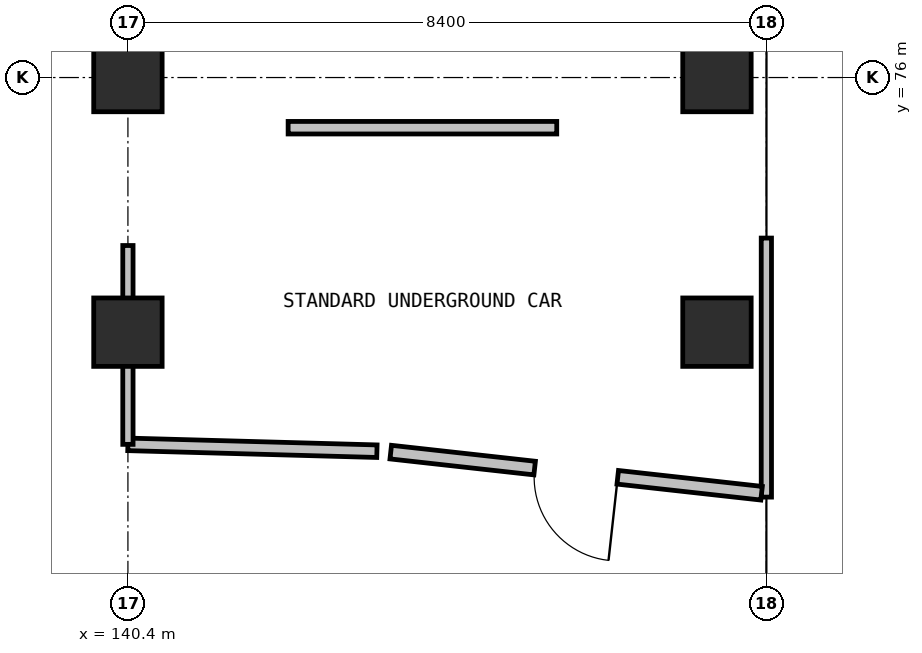
"""IFC4 building model, lengths in metres.
Left out: names, types, materials, properties, quantities, classifications, styles, units other than length and angle.
Written with IfcOpenShell. Run it as: python <this file> out.ifc"""

import sys

from ifc_helpers import new_model, si_unit, direction, frame, frame_2d, origin, origin_2d, place, context, subcontext, project, spatial, rectangle, extrude, element, fill, save


model = new_model("IFC4")
c1 = context("Model", 3, precision=1e-05, world=origin(), true_north=direction((0.0, 1.0)))
c2 = subcontext(c1, "Body", "Model", "MODEL_VIEW")
j1 = project(units=[si_unit("LENGTHUNIT", "METRE"), si_unit("PLANEANGLEUNIT", "RADIAN")], contexts=[c1])
p1 = place(None, origin())
s1 = spatial("IfcSite", under=j1, at=p1, CompositionType="ELEMENT")
p2 = place(p1, origin())
s2 = spatial("IfcBuilding", under=s1, at=p2, CompositionType="ELEMENT")
p3 = place(p2, frame((0.0, 0.0, -4.8)))
s3 = spatial("IfcBuildingStorey", under=s2, at=p3, CompositionType="ELEMENT", Elevation=-4.8)
for number, where, z_axis, x_axis in (
    (1, (140.4, 72.65, 0.0), (0.0, 0.0, 1.0), (1.0, 0.0, 0.0)),
    (2, (140.4, 76.0, 0.0), (0.0, 0.0, 1.0), (1.0, 0.0, 0.0)),
    (3, (148.15, 72.65, 0.0), (0.0, 0.0, 1.0), (1.0, 0.0, 0.0)),
    (4, (148.15, 76.0, 0.0), (0.0, 0.0, 1.0), (1.0, 0.0, 0.0)),
):
    element("IfcColumn", number, at=place(p3, frame(where, z_axis=z_axis, x_axis=x_axis)), inside=s3, PredefinedType="COLUMN", context=c2, shape_type="SweptSolid", body=[
        extrude(rectangle(XDim=0.9, YDim=0.9, at=origin_2d()), origin(), (0.0, 0.0, 1.0), 4.8),
    ])
p4 = place(p3, frame((142.508, 75.34, 0.0), z_axis=(0.0, 0.0, 1.0), x_axis=(1.0, 0.0, 0.0)))
e5 = element("IfcWall", 5, at=p4, inside=s3, PredefinedType="PARTITIONING", context=c2, shape_type="SweptSolid", body=[
    extrude(rectangle(XDim=3.534, YDim=0.165, at=frame_2d((1.767, 0.0))), origin(), (0.0, 0.0, 1.0), 4.45),
])
p5 = place(p3, frame((148.8, 73.888, 0.0), z_axis=(0.0, 0.0, 1.0), x_axis=(0.0, -1.0, 0.0)))
e6 = element("IfcWall", 6, at=p5, inside=s3, PredefinedType="PARTITIONING", context=c2, shape_type="SweptSolid", body=[
    extrude(rectangle(XDim=3.408, YDim=0.135, at=frame_2d((1.704, 0.0))), origin(), (0.0, 0.0, 1.0), 4.45),
])
p6 = place(p3, frame((148.737, 70.531, 0.0), z_axis=(0.0, 0.0, 1.0), x_axis=(-0.993908575841, 0.110207725998, 0.0)))
e7 = element("IfcWall", 7, at=p6, inside=s3, PredefinedType="PARTITIONING", context=c2, shape_type="SweptSolid", body=[
    extrude(rectangle(XDim=4.909, YDim=0.18, at=frame_2d((2.455, 0.0))), origin(), (0.0, 0.0, 1.0), 4.45),
])
p7 = place(p6, frame((1.904, 0.0, 0.0)))
e8 = element("IfcOpeningElement", 8, at=p7, cuts=e7, PredefinedType="OPENING", context=c2, shape_type="SweptSolid", body=[
    extrude(rectangle(XDim=1.1, YDim=2.15, at=frame_2d((0.55, 1.075))), frame((0.0, 0.1, 0.0), z_axis=(0.0, -1.0, 0.0), x_axis=(1.0, 0.0, 0.0)), (0.0, 0.0, 1.0), 0.2),
])
p8 = place(p3, frame((143.676, 71.084, 0.0), z_axis=(0.0, 0.0, 1.0), x_axis=(-0.999622135389, 0.02748793263, 0.0)))
e9 = element("IfcWall", 9, at=p8, inside=s3, PredefinedType="PARTITIONING", context=c2, shape_type="SweptSolid", body=[
    extrude(rectangle(XDim=3.277, YDim=0.165, at=frame_2d((1.639, 0.0))), origin(), (0.0, 0.0, 1.0), 4.45),
])
p9 = place(p3, frame((140.4, 71.174, 0.0), z_axis=(0.0, 0.0, 1.0), x_axis=(0.0, 1.0, 0.0)))
e10 = element("IfcWall", 10, at=p9, inside=s3, PredefinedType="PARTITIONING", context=c2, shape_type="SweptSolid", body=[
    extrude(rectangle(XDim=2.616, YDim=0.135, at=frame_2d((1.308, 0.0))), origin(), (0.0, 0.0, 1.0), 3.7),
])
p10 = place(p7, origin())
e11 = element("IfcDoor", 11, at=p10, inside=s3, OperationType="SINGLE_SWING_LEFT", PredefinedType="DOOR", context=c2, shape_type="SweptSolid", body=[
    extrude(rectangle(XDim=1.1, YDim=2.15, at=frame_2d((0.55, 1.075))), frame((0.0, 0.025, 0.0), z_axis=(0.0, -1.0, 0.0), x_axis=(1.0, 0.0, 0.0)), (0.0, 0.0, 1.0), 0.05),
])
fill(e8, e11)
save(model, sys.argv[1])
